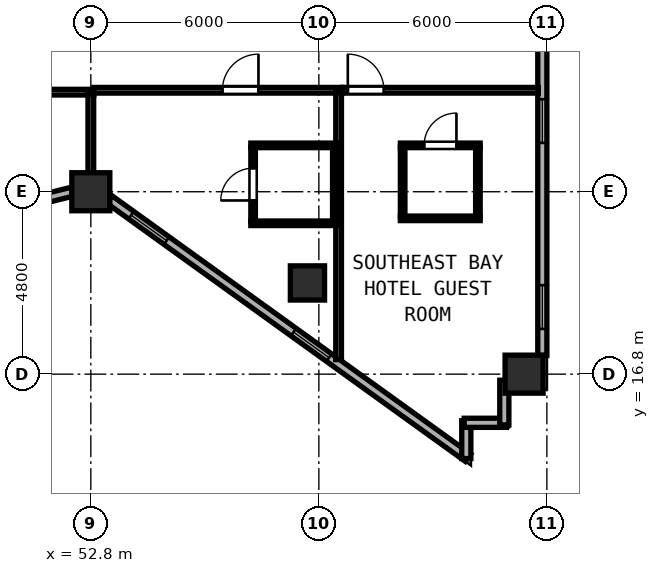
"""IFC4 building model, lengths in metres.
Left out: names, types, materials, properties, quantities, classifications, styles, units other than length and angle.
Written with IfcOpenShell. Run it as: python <this file> out.ifc"""

import sys

from ifc_helpers import new_model, si_unit, direction, frame, frame_2d, origin, origin_2d, place, context, subcontext, project, spatial, rectangle, hollow_rectangle, extrude, element, fill, save


model = new_model("IFC4")
c1 = context("Model", 3, precision=1e-05, world=origin(), true_north=direction((0.0, 1.0)))
c2 = subcontext(c1, "Body", "Model", "MODEL_VIEW")
j1 = project(units=[si_unit("LENGTHUNIT", "METRE"), si_unit("PLANEANGLEUNIT", "RADIAN")], contexts=[c1])
p1 = place(None, origin())
s1 = spatial("IfcSite", under=j1, at=p1, CompositionType="ELEMENT")
p2 = place(p1, origin())
s2 = spatial("IfcBuilding", under=s1, at=p2, CompositionType="ELEMENT")
p3 = place(p2, frame((0.0, 0.0, 113.6)))
s3 = spatial("IfcBuildingStorey", under=s2, at=p3, CompositionType="ELEMENT", Elevation=113.6)
for number, where, z_axis, x_axis in (
    (1, (52.8, 21.6, 0.0), (0.0, 0.0, 1.0), (1.0, 0.0, 0.0)),
    (2, (64.2, 16.8, 0.0), (0.0, 0.0, 1.0), (1.0, 0.0, 0.0)),
):
    element("IfcColumn", number, at=place(p3, frame(where, z_axis=z_axis, x_axis=x_axis)), inside=s3, PredefinedType="COLUMN", context=c2, shape_type="SweptSolid", body=[
        extrude(hollow_rectangle(XDim=1.0, YDim=1.0, WallThickness=0.038, at=origin_2d()), origin(), (0.0, 0.0, 1.0), 3.8),
    ])
p4 = place(p3, frame((58.5, 19.2, 0.0), z_axis=(0.0, 0.0, 1.0), x_axis=(1.0, 0.0, 0.0)))
e3 = element("IfcColumn", 3, at=p4, inside=s3, PredefinedType="COLUMN", context=c2, shape_type="SweptSolid", body=[
    extrude(hollow_rectangle(XDim=0.9, YDim=0.9, WallThickness=0.034, at=origin_2d()), origin(), (0.0, 0.0, 1.0), 3.8),
])
p5 = place(p3, frame((47.932, 20.507, 0.0), z_axis=(0.0, 0.0, 1.0), x_axis=(0.970145683738, 0.242522890311, 0.0)))
e4 = element("IfcWall", 4, at=p5, inside=s3, PredefinedType="SOLIDWALL", context=c2, shape_type="SweptSolid", body=[
    extrude(rectangle(XDim=4.511, YDim=0.24, at=frame_2d((2.255, 0.0))), origin(), (0.0, 0.0, 1.0), 3.145),
])
p6 = place(p5, frame((0.7, 0.0, 0.85)))
e5 = element("IfcOpeningElement", 5, at=p6, cuts=e4, PredefinedType="OPENING", context=c2, shape_type="SweptSolid", body=[
    extrude(rectangle(XDim=1.15, YDim=1.8, at=frame_2d((0.575, 0.9))), frame((0.0, 0.13, 0.0), z_axis=(0.0, -1.0, 0.0), x_axis=(1.0, 0.0, 0.0)), (0.0, 0.0, 1.0), 0.26),
])
p7 = place(p3, frame((53.292, 21.394, 0.0), z_axis=(0.0, 0.0, 1.0), x_axis=(0.811543504691, -0.584291998913, 0.0)))
e6 = element("IfcWall", 6, at=p7, inside=s3, PredefinedType="SOLIDWALL", context=c2, shape_type="SweptSolid", body=[
    extrude(rectangle(XDim=11.623, YDim=0.24, at=frame_2d((5.812, 0.0))), origin(), (0.0, 0.0, 1.0), 3.145),
])
p8 = place(p7, frame((0.7, 0.0, 0.85)))
e7 = element("IfcOpeningElement", 7, at=p8, cuts=e6, PredefinedType="OPENING", context=c2, shape_type="SweptSolid", body=[
    extrude(rectangle(XDim=1.15, YDim=1.8, at=frame_2d((0.575, 0.9))), frame((0.0, 0.13, 0.0), z_axis=(0.0, -1.0, 0.0), x_axis=(1.0, 0.0, 0.0)), (0.0, 0.0, 1.0), 0.26),
])
p9 = place(p7, frame((5.967, 0.0, 0.85)))
e8 = element("IfcOpeningElement", 8, at=p9, cuts=e6, PredefinedType="OPENING", context=c2, shape_type="SweptSolid", body=[
    extrude(rectangle(XDim=1.15, YDim=1.8, at=frame_2d((0.575, 0.9))), frame((0.0, 0.13, 0.0), z_axis=(0.0, -1.0, 0.0), x_axis=(1.0, 0.0, 0.0)), (0.0, 0.0, 1.0), 0.26),
])
p10 = place(p3, frame((62.68, 14.579, 0.0), z_axis=(0.0, 0.0, 1.0), x_axis=(0.0, 1.0, 0.0)))
e9 = element("IfcWall", 9, at=p10, inside=s3, PredefinedType="SOLIDWALL", context=c2, shape_type="SweptSolid", body=[
    extrude(rectangle(XDim=0.996, YDim=0.24, at=frame_2d((0.498, 0.0))), origin(), (0.0, 0.0, 1.0), 3.6),
])
p11 = place(p3, frame((62.625, 15.52, 0.0), z_axis=(0.0, 0.0, 1.0), x_axis=(1.0, 0.0, 0.0)))
e10 = element("IfcWall", 10, at=p11, inside=s3, PredefinedType="SOLIDWALL", context=c2, shape_type="SweptSolid", body=[
    extrude(rectangle(XDim=1.11, YDim=0.24, at=frame_2d((0.555, 0.0))), origin(), (0.0, 0.0, 1.0), 3.6),
])
p12 = place(p3, frame((63.68, 15.465, 0.0), z_axis=(0.0, 0.0, 1.0), x_axis=(0.0, 1.0, 0.0)))
e11 = element("IfcWall", 11, at=p12, inside=s3, PredefinedType="SOLIDWALL", context=c2, shape_type="SweptSolid", body=[
    extrude(rectangle(XDim=1.175, YDim=0.24, at=frame_2d((0.587, 0.0))), origin(), (0.0, 0.0, 1.0), 3.6),
])
p13 = place(p3, frame((64.68, 17.292, 0.0), z_axis=(0.0, 0.0, 1.0), x_axis=(0.0, 1.0, 0.0)))
e12 = element("IfcWall", 12, at=p13, inside=s3, PredefinedType="SOLIDWALL", context=c2, shape_type="SweptSolid", body=[
    extrude(rectangle(XDim=9.816, YDim=0.24, at=frame_2d((4.908, 0.0))), origin(), (0.0, 0.0, 1.0), 3.6),
])
p14 = place(p13, frame((0.7, 0.0, 0.85)))
e13 = element("IfcOpeningElement", 13, at=p14, cuts=e12, PredefinedType="OPENING", context=c2, shape_type="SweptSolid", body=[
    extrude(rectangle(XDim=1.15, YDim=1.8, at=frame_2d((0.575, 0.9))), frame((0.0, 0.13, 0.0), z_axis=(0.0, -1.0, 0.0), x_axis=(1.0, 0.0, 0.0)), (0.0, 0.0, 1.0), 0.26),
])
p15 = place(p13, frame((5.593, 0.0, 0.85)))
e14 = element("IfcOpeningElement", 14, at=p15, cuts=e12, PredefinedType="OPENING", context=c2, shape_type="SweptSolid", body=[
    extrude(rectangle(XDim=1.15, YDim=1.8, at=frame_2d((0.575, 0.9))), frame((0.0, 0.13, 0.0), z_axis=(0.0, -1.0, 0.0), x_axis=(1.0, 0.0, 0.0)), (0.0, 0.0, 1.0), 0.26),
])
p16 = place(p3, frame((45.682, 24.22, 0.0), z_axis=(0.0, 0.0, 1.0), x_axis=(1.0, 0.0, 0.0)))
e15 = element("IfcWall", 15, at=p16, inside=s3, PredefinedType="PARTITIONING", context=c2, shape_type="SweptSolid", body=[
    extrude(rectangle(XDim=7.198, YDim=0.15, at=frame_2d((3.599, 0.0))), origin(), (0.0, 0.0, 1.0), 3.6),
])
p17 = place(p16, frame((3.913, 0.0, 0.0), z_axis=(0.0, 0.0, 1.0), x_axis=(-1.0, 0.0, 0.0)))
e16 = element("IfcOpeningElement", 16, at=p17, cuts=e15, PredefinedType="OPENING", context=c2, shape_type="SweptSolid", body=[
    extrude(rectangle(XDim=0.95, YDim=2.12, at=frame_2d((0.475, 1.06))), frame((0.0, 0.085, 0.0), z_axis=(0.0, -1.0, 0.0), x_axis=(1.0, 0.0, 0.0)), (0.0, 0.0, 1.0), 0.17),
])
p18 = place(p3, frame((52.8, 21.819, 0.0), z_axis=(0.0, 0.0, 1.0), x_axis=(0.0, 1.0, 0.0)))
e17 = element("IfcWall", 17, at=p18, inside=s3, PredefinedType="PARTITIONING", context=c2, shape_type="SweptSolid", body=[
    extrude(rectangle(XDim=2.341, YDim=0.15, at=frame_2d((1.171, 0.0))), origin(), (0.0, 0.0, 1.0), 3.145),
])
p19 = place(p3, frame((52.882, 24.27, 0.0), z_axis=(0.0, 0.0, 1.0), x_axis=(1.0, 0.0, 0.0)))
e18 = element("IfcWall", 18, at=p19, inside=s3, PredefinedType="PARTITIONING", context=c2, shape_type="SweptSolid", body=[
    extrude(rectangle(XDim=6.538, YDim=0.15, at=frame_2d((3.269, 0.0))), origin(), (0.0, 0.0, 1.0), 3.6),
])
p20 = place(p19, frame((4.329, 0.0, 0.0), z_axis=(0.0, 0.0, 1.0), x_axis=(-1.0, 0.0, 0.0)))
e19 = element("IfcOpeningElement", 19, at=p20, cuts=e18, PredefinedType="OPENING", context=c2, shape_type="SweptSolid", body=[
    extrude(rectangle(XDim=0.95, YDim=2.15, at=frame_2d((0.475, 1.075))), frame((0.0, 0.085, 0.0), z_axis=(0.0, -1.0, 0.0), x_axis=(1.0, 0.0, 0.0)), (0.0, 0.0, 1.0), 0.17),
])
p21 = place(p3, frame((59.32, 17.183, 0.0), z_axis=(0.0, 0.0, 1.0), x_axis=(0.0, 1.0, 0.0)))
e20 = element("IfcWall", 20, at=p21, inside=s3, PredefinedType="PARTITIONING", context=c2, shape_type="SweptSolid", body=[
    extrude(rectangle(XDim=7.027, YDim=0.15, at=frame_2d((3.514, 0.0))), origin(), (0.0, 0.0, 1.0), 3.6),
])
for number, where, z_axis, x_axis in (
    (21, (57.01, 22.82, 0.0), (0.0, 0.0, 1.0), (1.0, 0.0, 0.0)),
    (22, (57.01, 20.77, 0.0), (0.0, 0.0, 1.0), (1.0, 0.0, 0.0)),
):
    element("IfcWall", number, at=place(p3, frame(where, z_axis=z_axis, x_axis=x_axis)), inside=s3, PredefinedType="PARTITIONING", context=c2, shape_type="SweptSolid", body=[
        extrude(rectangle(XDim=2.25, YDim=0.12, at=frame_2d((1.125, 0.0))), origin(), (0.0, 0.0, 1.0), 3.6),
    ])
p22 = place(p3, frame((57.07, 20.815, 0.0), z_axis=(0.0, 0.0, 1.0), x_axis=(0.0, 1.0, 0.0)))
e23 = element("IfcWall", 23, at=p22, inside=s3, PredefinedType="PARTITIONING", context=c2, shape_type="SweptSolid", body=[
    extrude(rectangle(XDim=1.96, YDim=0.12, at=frame_2d((0.98, 0.0))), origin(), (0.0, 0.0, 1.0), 3.6),
])
p23 = place(p22, frame((1.405, 0.0, 0.0), z_axis=(0.0, 0.0, 1.0), x_axis=(-1.0, 0.0, 0.0)))
e24 = element("IfcOpeningElement", 24, at=p23, cuts=e23, PredefinedType="OPENING", context=c2, shape_type="SweptSolid", body=[
    extrude(rectangle(XDim=0.85, YDim=2.1, at=frame_2d((0.425, 1.05))), frame((0.0, 0.07, 0.0), z_axis=(0.0, -1.0, 0.0), x_axis=(1.0, 0.0, 0.0)), (0.0, 0.0, 1.0), 0.14),
])
p24 = place(p3, frame((59.22, 20.815, 0.0), z_axis=(0.0, 0.0, 1.0), x_axis=(0.0, 1.0, 0.0)))
e25 = element("IfcWall", 25, at=p24, inside=s3, PredefinedType="PARTITIONING", context=c2, shape_type="SweptSolid", body=[
    extrude(rectangle(XDim=1.96, YDim=0.12, at=frame_2d((0.98, 0.0))), origin(), (0.0, 0.0, 1.0), 3.6),
])
p25 = place(p3, frame((59.422, 24.27, 0.0), z_axis=(0.0, 0.0, 1.0), x_axis=(1.0, 0.0, 0.0)))
e26 = element("IfcWall", 26, at=p25, inside=s3, PredefinedType="PARTITIONING", context=c2, shape_type="SweptSolid", body=[
    extrude(rectangle(XDim=5.153, YDim=0.15, at=frame_2d((2.576, 0.0))), origin(), (0.0, 0.0, 1.0), 3.6),
])
p26 = place(p25, frame((1.09, 0.0, 0.0), z_axis=(0.0, 0.0, 1.0), x_axis=(-1.0, 0.0, 0.0)))
e27 = element("IfcOpeningElement", 27, at=p26, cuts=e26, PredefinedType="OPENING", context=c2, shape_type="SweptSolid", body=[
    extrude(rectangle(XDim=0.95, YDim=2.15, at=frame_2d((0.475, 1.075))), frame((0.0, 0.085, 0.0), z_axis=(0.0, -1.0, 0.0), x_axis=(1.0, 0.0, 0.0)), (0.0, 0.0, 1.0), 0.17),
])
p27 = place(p3, frame((60.945, 22.82, 0.0), z_axis=(0.0, 0.0, 1.0), x_axis=(1.0, 0.0, 0.0)))
e28 = element("IfcWall", 28, at=p27, inside=s3, PredefinedType="PARTITIONING", context=c2, shape_type="SweptSolid", body=[
    extrude(rectangle(XDim=2.1, YDim=0.12, at=frame_2d((1.05, 0.0))), origin(), (0.0, 0.0, 1.0), 3.6),
])
p28 = place(p27, frame((1.475, 0.0, 0.0), z_axis=(0.0, 0.0, 1.0), x_axis=(-1.0, 0.0, 0.0)))
e29 = element("IfcOpeningElement", 29, at=p28, cuts=e28, PredefinedType="OPENING", context=c2, shape_type="SweptSolid", body=[
    extrude(rectangle(XDim=0.85, YDim=2.1, at=frame_2d((0.425, 1.05))), frame((0.0, 0.07, 0.0), z_axis=(0.0, -1.0, 0.0), x_axis=(1.0, 0.0, 0.0)), (0.0, 0.0, 1.0), 0.14),
])
p29 = place(p3, frame((60.945, 20.9, 0.0), z_axis=(0.0, 0.0, 1.0), x_axis=(1.0, 0.0, 0.0)))
e30 = element("IfcWall", 30, at=p29, inside=s3, PredefinedType="PARTITIONING", context=c2, shape_type="SweptSolid", body=[
    extrude(rectangle(XDim=2.1, YDim=0.12, at=frame_2d((1.05, 0.0))), origin(), (0.0, 0.0, 1.0), 3.6),
])
for number, where, z_axis, x_axis in (
    (31, (61.005, 20.945, 0.0), (0.0, 0.0, 1.0), (0.0, 1.0, 0.0)),
    (32, (62.985, 20.945, 0.0), (0.0, 0.0, 1.0), (0.0, 1.0, 0.0)),
):
    element("IfcWall", number, at=place(p3, frame(where, z_axis=z_axis, x_axis=x_axis)), inside=s3, PredefinedType="PARTITIONING", context=c2, shape_type="SweptSolid", body=[
        extrude(rectangle(XDim=1.83, YDim=0.12, at=frame_2d((0.915, 0.0))), origin(), (0.0, 0.0, 1.0), 3.6),
    ])
p30 = place(p8, origin())
e33 = element("IfcWindow", 33, at=p30, inside=s3, PartitioningType="SINGLE_PANEL", PredefinedType="WINDOW", context=c2, shape_type="SweptSolid", body=[
    extrude(rectangle(XDim=1.15, YDim=1.8, at=frame_2d((0.575, 0.9))), frame((0.0, 0.03, 0.0), z_axis=(0.0, -1.0, 0.0), x_axis=(1.0, 0.0, 0.0)), (0.0, 0.0, 1.0), 0.06),
])
fill(e7, e33)
p31 = place(p9, origin())
e34 = element("IfcWindow", 34, at=p31, inside=s3, PartitioningType="SINGLE_PANEL", PredefinedType="WINDOW", context=c2, shape_type="SweptSolid", body=[
    extrude(rectangle(XDim=1.15, YDim=1.8, at=frame_2d((0.575, 0.9))), frame((0.0, 0.03, 0.0), z_axis=(0.0, -1.0, 0.0), x_axis=(1.0, 0.0, 0.0)), (0.0, 0.0, 1.0), 0.06),
])
fill(e8, e34)
p32 = place(p14, origin())
e35 = element("IfcWindow", 35, at=p32, inside=s3, PartitioningType="SINGLE_PANEL", PredefinedType="WINDOW", context=c2, shape_type="SweptSolid", body=[
    extrude(rectangle(XDim=1.15, YDim=1.8, at=frame_2d((0.575, 0.9))), frame((0.0, 0.03, 0.0), z_axis=(0.0, -1.0, 0.0), x_axis=(1.0, 0.0, 0.0)), (0.0, 0.0, 1.0), 0.06),
])
fill(e13, e35)
p33 = place(p15, origin())
e36 = element("IfcWindow", 36, at=p33, inside=s3, PartitioningType="SINGLE_PANEL", PredefinedType="WINDOW", context=c2, shape_type="SweptSolid", body=[
    extrude(rectangle(XDim=1.15, YDim=1.8, at=frame_2d((0.575, 0.9))), frame((0.0, 0.03, 0.0), z_axis=(0.0, -1.0, 0.0), x_axis=(1.0, 0.0, 0.0)), (0.0, 0.0, 1.0), 0.06),
])
fill(e14, e36)
p34 = place(p20, origin())
e37 = element("IfcDoor", 37, at=p34, inside=s3, OperationType="SINGLE_SWING_LEFT", PredefinedType="DOOR", context=c2, shape_type="SweptSolid", body=[
    extrude(rectangle(XDim=0.95, YDim=2.15, at=frame_2d((0.475, 1.075))), frame((0.0, 0.025, 0.0), z_axis=(0.0, -1.0, 0.0), x_axis=(1.0, 0.0, 0.0)), (0.0, 0.0, 1.0), 0.05),
])
fill(e19, e37)
p35 = place(p23, origin())
e38 = element("IfcDoor", 38, at=p35, inside=s3, OperationType="SINGLE_SWING_RIGHT", PredefinedType="DOOR", context=c2, shape_type="SweptSolid", body=[
    extrude(rectangle(XDim=0.85, YDim=2.1, at=frame_2d((0.425, 1.05))), frame((0.0, 0.025, 0.0), z_axis=(0.0, -1.0, 0.0), x_axis=(1.0, 0.0, 0.0)), (0.0, 0.0, 1.0), 0.05),
])
fill(e24, e38)
p36 = place(p26, origin())
e39 = element("IfcDoor", 39, at=p36, inside=s3, OperationType="SINGLE_SWING_RIGHT", PredefinedType="DOOR", context=c2, shape_type="SweptSolid", body=[
    extrude(rectangle(XDim=0.95, YDim=2.15, at=frame_2d((0.475, 1.075))), frame((0.0, 0.025, 0.0), z_axis=(0.0, -1.0, 0.0), x_axis=(1.0, 0.0, 0.0)), (0.0, 0.0, 1.0), 0.05),
])
fill(e27, e39)
p37 = place(p28, origin())
e40 = element("IfcDoor", 40, at=p37, inside=s3, OperationType="SINGLE_SWING_LEFT", PredefinedType="DOOR", context=c2, shape_type="SweptSolid", body=[
    extrude(rectangle(XDim=0.85, YDim=2.1, at=frame_2d((0.425, 1.05))), frame((0.0, 0.025, 0.0), z_axis=(0.0, -1.0, 0.0), x_axis=(1.0, 0.0, 0.0)), (0.0, 0.0, 1.0), 0.05),
])
fill(e29, e40)
save(model, sys.argv[1])
